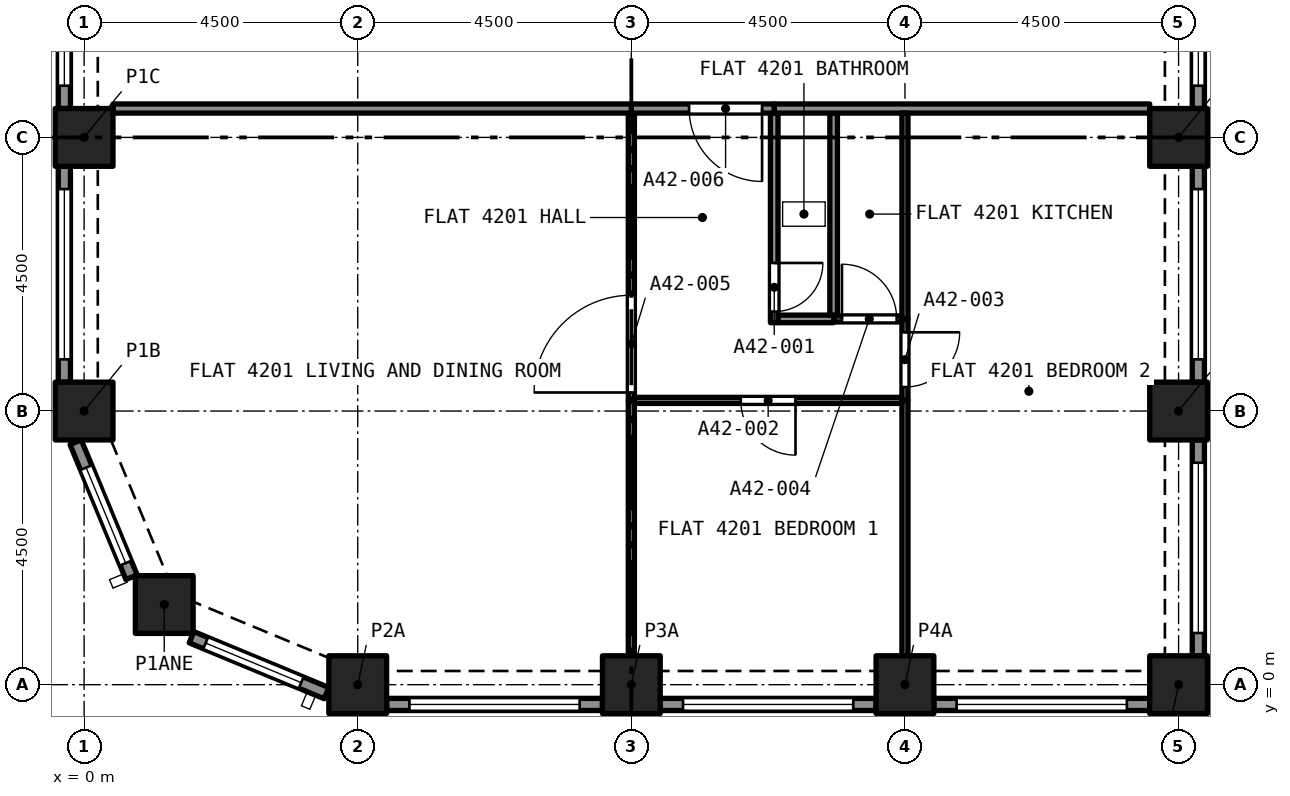
"""IFC4 building model, lengths in metres.
Left out: names, types, materials, properties, quantities, classifications, styles, units other than length and angle.
Written with IfcOpenShell. Run it as: python <this file> out.ifc"""

import sys

from ifc_helpers import new_model, si_unit, direction, frame, frame_2d, origin, origin_2d, place, context, subcontext, project, spatial, rectangle, extrude, element, fill, save


model = new_model("IFC4")
c1 = context("Model", 3, precision=1e-05, world=origin(), true_north=direction((0.0, 1.0)))
c2 = subcontext(c1, "Body", "Model", "MODEL_VIEW")
j1 = project(units=[si_unit("LENGTHUNIT", "METRE"), si_unit("PLANEANGLEUNIT", "RADIAN")], contexts=[c1])
p1 = place(None, origin())
s1 = spatial("IfcSite", under=j1, at=p1, CompositionType="ELEMENT")
p2 = place(p1, origin())
s2 = spatial("IfcBuilding", under=s1, at=p2, CompositionType="ELEMENT")
p3 = place(p2, frame((0.0, 0.0, 150.6)))
s3 = spatial("IfcBuildingStorey", under=s2, at=p3, CompositionType="ELEMENT", Elevation=150.6)
for number, where, z_axis, x_axis in (
    (1, (4.5, 0.0, 0.0), (0.0, 0.0, 1.0), (1.0, 0.0, 0.0)),
    (2, (9.0, 0.0, 0.0), (0.0, 0.0, 1.0), (1.0, 0.0, 0.0)),
    (3, (13.5, 0.0, 0.0), (0.0, 0.0, 1.0), (1.0, 0.0, 0.0)),
    (4, (18.0, 0.0, 0.0), (0.0, 0.0, 1.0), (1.0, 0.0, 0.0)),
    (5, (1.318, 1.318, 0.0), (0.0, 0.0, 1.0), (1.0, 0.0, 0.0)),
    (6, (0.0, 4.5, 0.0), (0.0, 0.0, 1.0), (1.0, 0.0, 0.0)),
    (7, (18.0, 4.5, 0.0), (0.0, 0.0, 1.0), (1.0, 0.0, 0.0)),
    (8, (0.0, 9.0, 0.0), (0.0, 0.0, 1.0), (1.0, 0.0, 0.0)),
    (9, (18.0, 9.0, 0.0), (0.0, 0.0, 1.0), (1.0, 0.0, 0.0)),
):
    element("IfcColumn", number, at=place(p3, frame(where, z_axis=z_axis, x_axis=x_axis)), inside=s3, PredefinedType="COLUMN", context=c2, shape_type="SweptSolid", body=[
        extrude(rectangle(XDim=0.95, YDim=0.95, at=origin_2d()), origin(), (0.0, 0.0, 1.0), 4.4),
    ])
p4 = place(p3, frame((-0.325, 9.475, 0.0), z_axis=(0.0, 0.0, 1.0), x_axis=(0.0, 1.0, 0.0)))
e10 = element("IfcWall", 10, at=p4, inside=s3, PredefinedType="SOLIDWALL", context=c2, shape_type="SweptSolid", body=[
    extrude(rectangle(XDim=3.55, YDim=0.2, at=frame_2d((1.775, 0.0))), origin(), (0.0, 0.0, 1.0), 4.4),
])
p5 = place(p4, frame((0.375, 0.0, 0.45)))
e11 = element("IfcOpeningElement", 11, at=p5, cuts=e10, PredefinedType="OPENING", context=c2, shape_type="SweptSolid", body=[
    extrude(rectangle(XDim=2.8, YDim=2.55, at=frame_2d((1.4, 1.275))), frame((0.0, 0.11, 0.0), z_axis=(0.0, -1.0, 0.0), x_axis=(1.0, 0.0, 0.0)), (0.0, 0.0, 1.0), 0.22),
])
p6 = place(p3, frame((-0.325, 4.975, 0.0), z_axis=(0.0, 0.0, 1.0), x_axis=(0.0, 1.0, 0.0)))
e12 = element("IfcWall", 12, at=p6, inside=s3, PredefinedType="SOLIDWALL", context=c2, shape_type="SweptSolid", body=[
    extrude(rectangle(XDim=3.55, YDim=0.2, at=frame_2d((1.775, 0.0))), origin(), (0.0, 0.0, 1.0), 4.4),
])
p7 = place(p6, frame((0.375, 0.0, 0.45)))
e13 = element("IfcOpeningElement", 13, at=p7, cuts=e12, PredefinedType="OPENING", context=c2, shape_type="SweptSolid", body=[
    extrude(rectangle(XDim=2.8, YDim=2.55, at=frame_2d((1.4, 1.275))), frame((0.0, 0.11, 0.0), z_axis=(0.0, -1.0, 0.0), x_axis=(1.0, 0.0, 0.0)), (0.0, 0.0, 1.0), 0.22),
])
p8 = place(p3, frame((0.78, 1.767, 0.0), z_axis=(0.0, 0.0, 1.0), x_axis=(-0.382680855588, 0.923880599843, 0.0)))
e14 = element("IfcWall", 14, at=p8, inside=s3, PredefinedType="SOLIDWALL", context=c2, shape_type="SweptSolid", body=[
    extrude(rectangle(XDim=2.403, YDim=0.2, at=frame_2d((1.201, 0.0))), origin(), (0.0, 0.0, 1.0), 4.4),
])
p9 = place(p8, frame((0.251, 0.0, 0.45)))
e15 = element("IfcOpeningElement", 15, at=p9, cuts=e14, PredefinedType="OPENING", context=c2, shape_type="SweptSolid", body=[
    extrude(rectangle(XDim=1.7, YDim=2.55, at=frame_2d((0.85, 1.275))), frame((0.0, 0.11, 0.0), z_axis=(0.0, -1.0, 0.0), x_axis=(1.0, 0.0, 0.0)), (0.0, 0.0, 1.0), 0.22),
])
p10 = place(p3, frame((3.987, -0.139, 0.0), z_axis=(0.0, 0.0, 1.0), x_axis=(-0.923880599843, 0.382680855588, 0.0)))
e16 = element("IfcWall", 16, at=p10, inside=s3, PredefinedType="SOLIDWALL", context=c2, shape_type="SweptSolid", body=[
    extrude(rectangle(XDim=2.403, YDim=0.2, at=frame_2d((1.201, 0.0))), origin(), (0.0, 0.0, 1.0), 4.4),
])
p11 = place(p10, frame((0.451, 0.0, 0.45)))
e17 = element("IfcOpeningElement", 17, at=p11, cuts=e16, PredefinedType="OPENING", context=c2, shape_type="SweptSolid", body=[
    extrude(rectangle(XDim=1.7, YDim=2.55, at=frame_2d((0.85, 1.275))), frame((0.0, 0.11, 0.0), z_axis=(0.0, -1.0, 0.0), x_axis=(1.0, 0.0, 0.0)), (0.0, 0.0, 1.0), 0.22),
])
p12 = place(p3, frame((8.525, -0.325, 0.0), z_axis=(0.0, 0.0, 1.0), x_axis=(-1.0, 0.0, 0.0)))
e18 = element("IfcWall", 18, at=p12, inside=s3, PredefinedType="SOLIDWALL", context=c2, shape_type="SweptSolid", body=[
    extrude(rectangle(XDim=3.55, YDim=0.2, at=frame_2d((1.775, 0.0))), origin(), (0.0, 0.0, 1.0), 4.4),
])
p13 = place(p12, frame((0.375, 0.0, 0.45)))
e19 = element("IfcOpeningElement", 19, at=p13, cuts=e18, PredefinedType="OPENING", context=c2, shape_type="SweptSolid", body=[
    extrude(rectangle(XDim=2.8, YDim=2.55, at=frame_2d((1.4, 1.275))), frame((0.0, 0.11, 0.0), z_axis=(0.0, -1.0, 0.0), x_axis=(1.0, 0.0, 0.0)), (0.0, 0.0, 1.0), 0.22),
])
p14 = place(p3, frame((13.025, -0.325, 0.0), z_axis=(0.0, 0.0, 1.0), x_axis=(-1.0, 0.0, 0.0)))
e20 = element("IfcWall", 20, at=p14, inside=s3, PredefinedType="SOLIDWALL", context=c2, shape_type="SweptSolid", body=[
    extrude(rectangle(XDim=3.55, YDim=0.2, at=frame_2d((1.775, 0.0))), origin(), (0.0, 0.0, 1.0), 4.4),
])
p15 = place(p14, frame((0.375, 0.0, 0.45)))
e21 = element("IfcOpeningElement", 21, at=p15, cuts=e20, PredefinedType="OPENING", context=c2, shape_type="SweptSolid", body=[
    extrude(rectangle(XDim=2.8, YDim=2.55, at=frame_2d((1.4, 1.275))), frame((0.0, 0.11, 0.0), z_axis=(0.0, -1.0, 0.0), x_axis=(1.0, 0.0, 0.0)), (0.0, 0.0, 1.0), 0.22),
])
p16 = place(p3, frame((17.525, -0.325, 0.0), z_axis=(0.0, 0.0, 1.0), x_axis=(-1.0, 0.0, 0.0)))
e22 = element("IfcWall", 22, at=p16, inside=s3, PredefinedType="SOLIDWALL", context=c2, shape_type="SweptSolid", body=[
    extrude(rectangle(XDim=3.55, YDim=0.2, at=frame_2d((1.775, 0.0))), origin(), (0.0, 0.0, 1.0), 4.4),
])
p17 = place(p16, frame((0.375, 0.0, 0.45)))
e23 = element("IfcOpeningElement", 23, at=p17, cuts=e22, PredefinedType="OPENING", context=c2, shape_type="SweptSolid", body=[
    extrude(rectangle(XDim=2.8, YDim=2.55, at=frame_2d((1.4, 1.275))), frame((0.0, 0.11, 0.0), z_axis=(0.0, -1.0, 0.0), x_axis=(1.0, 0.0, 0.0)), (0.0, 0.0, 1.0), 0.22),
])
p18 = place(p3, frame((18.325, 4.025, 0.0), z_axis=(0.0, 0.0, 1.0), x_axis=(0.0, -1.0, 0.0)))
e24 = element("IfcWall", 24, at=p18, inside=s3, PredefinedType="SOLIDWALL", context=c2, shape_type="SweptSolid", body=[
    extrude(rectangle(XDim=3.55, YDim=0.2, at=frame_2d((1.775, 0.0))), origin(), (0.0, 0.0, 1.0), 4.4),
])
p19 = place(p18, frame((0.375, 0.0, 0.45)))
e25 = element("IfcOpeningElement", 25, at=p19, cuts=e24, PredefinedType="OPENING", context=c2, shape_type="SweptSolid", body=[
    extrude(rectangle(XDim=2.8, YDim=2.55, at=frame_2d((1.4, 1.275))), frame((0.0, 0.11, 0.0), z_axis=(0.0, -1.0, 0.0), x_axis=(1.0, 0.0, 0.0)), (0.0, 0.0, 1.0), 0.22),
])
p20 = place(p3, frame((18.325, 8.525, 0.0), z_axis=(0.0, 0.0, 1.0), x_axis=(0.0, -1.0, 0.0)))
e26 = element("IfcWall", 26, at=p20, inside=s3, PredefinedType="SOLIDWALL", context=c2, shape_type="SweptSolid", body=[
    extrude(rectangle(XDim=3.55, YDim=0.2, at=frame_2d((1.775, 0.0))), origin(), (0.0, 0.0, 1.0), 4.4),
])
p21 = place(p20, frame((0.375, 0.0, 0.45)))
e27 = element("IfcOpeningElement", 27, at=p21, cuts=e26, PredefinedType="OPENING", context=c2, shape_type="SweptSolid", body=[
    extrude(rectangle(XDim=2.8, YDim=2.55, at=frame_2d((1.4, 1.275))), frame((0.0, 0.11, 0.0), z_axis=(0.0, -1.0, 0.0), x_axis=(1.0, 0.0, 0.0)), (0.0, 0.0, 1.0), 0.22),
])
p22 = place(p3, frame((18.325, 13.025, 0.0), z_axis=(0.0, 0.0, 1.0), x_axis=(0.0, -1.0, 0.0)))
e28 = element("IfcWall", 28, at=p22, inside=s3, PredefinedType="SOLIDWALL", context=c2, shape_type="SweptSolid", body=[
    extrude(rectangle(XDim=3.55, YDim=0.2, at=frame_2d((1.775, 0.0))), origin(), (0.0, 0.0, 1.0), 4.4),
])
p23 = place(p22, frame((0.375, 0.0, 0.45)))
e29 = element("IfcOpeningElement", 29, at=p23, cuts=e28, PredefinedType="OPENING", context=c2, shape_type="SweptSolid", body=[
    extrude(rectangle(XDim=2.8, YDim=2.55, at=frame_2d((1.4, 1.275))), frame((0.0, 0.11, 0.0), z_axis=(0.0, -1.0, 0.0), x_axis=(1.0, 0.0, 0.0)), (0.0, 0.0, 1.0), 0.22),
])
p24 = place(p3, frame((11.413, 6.015, 0.0), z_axis=(0.0, 0.0, 1.0), x_axis=(1.0, 0.0, 0.0)))
e30 = element("IfcWall", 30, at=p24, inside=s3, PredefinedType="PARTITIONING", context=c2, shape_type="SweptSolid", body=[
    extrude(rectangle(XDim=0.915, YDim=0.125, at=frame_2d((0.458, 0.0))), origin(), (0.0, 0.0, 1.0), 4.1),
])
p25 = place(p3, frame((11.35, 9.4, 0.0), z_axis=(0.0, 0.0, 1.0), x_axis=(0.0, -1.0, 0.0)))
e31 = element("IfcWall", 31, at=p25, inside=s3, PredefinedType="PARTITIONING", context=c2, shape_type="SweptSolid", body=[
    extrude(rectangle(XDim=3.448, YDim=0.125, at=frame_2d((1.724, 0.0))), origin(), (0.0, 0.0, 1.0), 4.1),
])
p26 = place(p25, frame((2.465, 0.0, 0.0)))
e32 = element("IfcOpeningElement", 32, at=p26, cuts=e31, PredefinedType="OPENING", context=c2, shape_type="SweptSolid", body=[
    extrude(rectangle(XDim=0.8, YDim=2.1, at=frame_2d((0.4, 1.05))), frame((0.0, 0.073, 0.0), z_axis=(0.0, -1.0, 0.0), x_axis=(1.0, 0.0, 0.0)), (0.0, 0.0, 1.0), 0.145),
])
p27 = place(p3, frame((12.327, 6.077, 0.0), z_axis=(0.0, 0.0, 1.0), x_axis=(0.0, 1.0, 0.0)))
e33 = element("IfcWall", 33, at=p27, inside=s3, PredefinedType="PARTITIONING", context=c2, shape_type="SweptSolid", body=[
    extrude(rectangle(XDim=3.323, YDim=0.125, at=frame_2d((1.661, 0.0))), origin(), (0.0, 0.0, 1.0), 4.1),
])
p28 = place(p3, frame((11.35, 9.475, 0.0), z_axis=(0.0, 0.0, 1.0), x_axis=(1.0, 0.0, 0.0)))
e34 = element("IfcWall", 34, at=p28, inside=s3, PredefinedType="PARTITIONING", context=c2, shape_type="SweptSolid", body=[
    extrude(rectangle(XDim=6.175, YDim=0.15, at=frame_2d((3.087, 0.0))), origin(), (0.0, 0.0, 1.0), 4.1),
])
p29 = place(p3, frame((13.5, 0.475, 0.0), z_axis=(0.0, 0.0, 1.0), x_axis=(0.0, 1.0, 0.0)))
e35 = element("IfcWall", 35, at=p29, inside=s3, PredefinedType="PARTITIONING", context=c2, shape_type="SweptSolid", body=[
    extrude(rectangle(XDim=4.2, YDim=0.1, at=frame_2d((2.1, 0.0))), origin(), (0.0, 0.0, 1.0), 4.1),
])
p30 = place(p3, frame((13.45, 4.675, 0.0), z_axis=(0.0, 0.0, 1.0), x_axis=(-1.0, 0.0, 0.0)))
e36 = element("IfcWall", 36, at=p30, inside=s3, PredefinedType="PARTITIONING", context=c2, shape_type="SweptSolid", body=[
    extrude(rectangle(XDim=4.4, YDim=0.1, at=frame_2d((2.2, 0.0))), origin(), (0.0, 0.0, 1.0), 4.1),
])
p31 = place(p30, frame((1.75, 0.0, 0.0)))
e37 = element("IfcOpeningElement", 37, at=p31, cuts=e36, PredefinedType="OPENING", context=c2, shape_type="SweptSolid", body=[
    extrude(rectangle(XDim=0.9, YDim=2.1, at=frame_2d((0.45, 1.05))), frame((0.0, 0.06, 0.0), z_axis=(0.0, -1.0, 0.0), x_axis=(1.0, 0.0, 0.0)), (0.0, 0.0, 1.0), 0.12),
])
p32 = place(p3, frame((9.0, 0.475, 0.0), z_axis=(0.0, 0.0, 1.0), x_axis=(0.0, 1.0, 0.0)))
e38 = element("IfcWall", 38, at=p32, inside=s3, PredefinedType="PARTITIONING", context=c2, shape_type="SweptSolid", body=[
    extrude(rectangle(XDim=4.2, YDim=0.1, at=frame_2d((2.1, 0.0))), origin(), (0.0, 0.0, 1.0), 4.1),
])
p33 = place(p3, frame((13.5, 6.015, 0.0), z_axis=(0.0, 0.0, 1.0), x_axis=(0.0, -1.0, 0.0)))
e39 = element("IfcWall", 39, at=p33, inside=s3, PredefinedType="PARTITIONING", context=c2, shape_type="SweptSolid", body=[
    extrude(rectangle(XDim=1.34, YDim=0.1, at=frame_2d((0.67, 0.0))), origin(), (0.0, 0.0, 1.0), 4.1),
])
p34 = place(p33, frame((0.22, 0.0, 0.0)))
e40 = element("IfcOpeningElement", 40, at=p34, cuts=e39, PredefinedType="OPENING", context=c2, shape_type="SweptSolid", body=[
    extrude(rectangle(XDim=0.9, YDim=2.1, at=frame_2d((0.45, 1.05))), frame((0.0, 0.06, 0.0), z_axis=(0.0, -1.0, 0.0), x_axis=(1.0, 0.0, 0.0)), (0.0, 0.0, 1.0), 0.12),
])
p35 = place(p3, frame((13.5, 6.015, 0.0), z_axis=(0.0, 0.0, 1.0), x_axis=(0.0, 1.0, 0.0)))
e41 = element("IfcWall", 41, at=p35, inside=s3, PredefinedType="PARTITIONING", context=c2, shape_type="SweptSolid", body=[
    extrude(rectangle(XDim=3.385, YDim=0.1, at=frame_2d((1.692, 0.0))), origin(), (0.0, 0.0, 1.0), 4.1),
])
p36 = place(p3, frame((12.327, 6.015, 0.0), z_axis=(0.0, 0.0, 1.0), x_axis=(1.0, 0.0, 0.0)))
e42 = element("IfcWall", 42, at=p36, inside=s3, PredefinedType="PARTITIONING", context=c2, shape_type="SweptSolid", body=[
    extrude(rectangle(XDim=1.123, YDim=0.1, at=frame_2d((0.561, 0.0))), origin(), (0.0, 0.0, 1.0), 4.1),
])
p37 = place(p36, frame((0.136, 0.0, 0.0)))
e43 = element("IfcOpeningElement", 43, at=p37, cuts=e42, PredefinedType="OPENING", context=c2, shape_type="SweptSolid", body=[
    extrude(rectangle(XDim=0.9, YDim=2.1, at=frame_2d((0.45, 1.05))), frame((0.0, 0.06, 0.0), z_axis=(0.0, -1.0, 0.0), x_axis=(1.0, 0.0, 0.0)), (0.0, 0.0, 1.0), 0.12),
])
p38 = place(p3, frame((9.0, 4.675, 0.0), z_axis=(0.0, 0.0, 1.0), x_axis=(0.0, 1.0, 0.0)))
e44 = element("IfcWall", 44, at=p38, inside=s3, PredefinedType="PARTITIONING", context=c2, shape_type="SweptSolid", body=[
    extrude(rectangle(XDim=4.725, YDim=0.1, at=frame_2d((2.362, 0.0))), origin(), (0.0, 0.0, 1.0), 4.1),
])
p39 = place(p38, frame((0.13, 0.0, 0.0)))
e45 = element("IfcOpeningElement", 45, at=p39, cuts=e44, PredefinedType="OPENING", context=c2, shape_type="SweptSolid", body=[
    extrude(rectangle(XDim=1.6, YDim=2.1, at=frame_2d((0.8, 1.05))), frame((0.0, 0.06, 0.0), z_axis=(0.0, -1.0, 0.0), x_axis=(1.0, 0.0, 0.0)), (0.0, 0.0, 1.0), 0.12),
])
p40 = place(p3, frame((11.35, 9.475, 0.0), z_axis=(0.0, 0.0, 1.0), x_axis=(-1.0, 0.0, 0.0)))
e46 = element("IfcWall", 46, at=p40, inside=s3, PredefinedType="PARTITIONING", context=c2, shape_type="SweptSolid", body=[
    extrude(rectangle(XDim=2.35, YDim=0.15, at=frame_2d((1.175, 0.0))), origin(), (0.0, 0.0, 1.0), 4.1),
])
p41 = place(p40, frame((0.2, 0.0, 0.0)))
e47 = element("IfcOpeningElement", 47, at=p41, cuts=e46, PredefinedType="OPENING", context=c2, shape_type="SweptSolid", body=[
    extrude(rectangle(XDim=1.2, YDim=2.4, at=frame_2d((0.6, 1.2))), frame((0.0, 0.085, 0.0), z_axis=(0.0, -1.0, 0.0), x_axis=(1.0, 0.0, 0.0)), (0.0, 0.0, 1.0), 0.17),
])
p42 = place(p3, frame((0.475, 9.475, 0.0), z_axis=(0.0, 0.0, 1.0), x_axis=(1.0, 0.0, 0.0)))
e48 = element("IfcWall", 48, at=p42, inside=s3, PredefinedType="PARTITIONING", context=c2, shape_type="SweptSolid", body=[
    extrude(rectangle(XDim=8.525, YDim=0.15, at=frame_2d((4.262, 0.0))), origin(), (0.0, 0.0, 1.0), 4.1),
])
p43 = place(p5, origin())
e49 = element("IfcWindow", 49, at=p43, inside=s3, PartitioningType="SINGLE_PANEL", PredefinedType="WINDOW", context=c2, shape_type="SweptSolid", body=[
    extrude(rectangle(XDim=2.8, YDim=2.55, at=frame_2d((1.4, 1.275))), frame((0.0, 0.03, 0.0), z_axis=(0.0, -1.0, 0.0), x_axis=(1.0, 0.0, 0.0)), (0.0, 0.0, 1.0), 0.06),
])
fill(e11, e49)
p44 = place(p7, origin())
e50 = element("IfcWindow", 50, at=p44, inside=s3, PartitioningType="SINGLE_PANEL", PredefinedType="WINDOW", context=c2, shape_type="SweptSolid", body=[
    extrude(rectangle(XDim=2.8, YDim=2.55, at=frame_2d((1.4, 1.275))), frame((0.0, 0.03, 0.0), z_axis=(0.0, -1.0, 0.0), x_axis=(1.0, 0.0, 0.0)), (0.0, 0.0, 1.0), 0.06),
])
fill(e13, e50)
p45 = place(p9, origin())
e51 = element("IfcWindow", 51, at=p45, inside=s3, PartitioningType="SINGLE_PANEL", PredefinedType="WINDOW", context=c2, shape_type="SweptSolid", body=[
    extrude(rectangle(XDim=1.7, YDim=2.55, at=frame_2d((0.85, 1.275))), frame((0.0, 0.03, 0.0), z_axis=(0.0, -1.0, 0.0), x_axis=(1.0, 0.0, 0.0)), (0.0, 0.0, 1.0), 0.06),
])
fill(e15, e51)
p46 = place(p11, origin())
e52 = element("IfcWindow", 52, at=p46, inside=s3, PartitioningType="SINGLE_PANEL", PredefinedType="WINDOW", context=c2, shape_type="SweptSolid", body=[
    extrude(rectangle(XDim=1.7, YDim=2.55, at=frame_2d((0.85, 1.275))), frame((0.0, 0.03, 0.0), z_axis=(0.0, -1.0, 0.0), x_axis=(1.0, 0.0, 0.0)), (0.0, 0.0, 1.0), 0.06),
])
fill(e17, e52)
p47 = place(p13, origin())
e53 = element("IfcWindow", 53, at=p47, inside=s3, PartitioningType="SINGLE_PANEL", PredefinedType="WINDOW", context=c2, shape_type="SweptSolid", body=[
    extrude(rectangle(XDim=2.8, YDim=2.55, at=frame_2d((1.4, 1.275))), frame((0.0, 0.03, 0.0), z_axis=(0.0, -1.0, 0.0), x_axis=(1.0, 0.0, 0.0)), (0.0, 0.0, 1.0), 0.06),
])
fill(e19, e53)
p48 = place(p15, origin())
e54 = element("IfcWindow", 54, at=p48, inside=s3, PartitioningType="SINGLE_PANEL", PredefinedType="WINDOW", context=c2, shape_type="SweptSolid", body=[
    extrude(rectangle(XDim=2.8, YDim=2.55, at=frame_2d((1.4, 1.275))), frame((0.0, 0.03, 0.0), z_axis=(0.0, -1.0, 0.0), x_axis=(1.0, 0.0, 0.0)), (0.0, 0.0, 1.0), 0.06),
])
fill(e21, e54)
p49 = place(p17, origin())
e55 = element("IfcWindow", 55, at=p49, inside=s3, PartitioningType="SINGLE_PANEL", PredefinedType="WINDOW", context=c2, shape_type="SweptSolid", body=[
    extrude(rectangle(XDim=2.8, YDim=2.55, at=frame_2d((1.4, 1.275))), frame((0.0, 0.03, 0.0), z_axis=(0.0, -1.0, 0.0), x_axis=(1.0, 0.0, 0.0)), (0.0, 0.0, 1.0), 0.06),
])
fill(e23, e55)
p50 = place(p19, origin())
e56 = element("IfcWindow", 56, at=p50, inside=s3, PartitioningType="SINGLE_PANEL", PredefinedType="WINDOW", context=c2, shape_type="SweptSolid", body=[
    extrude(rectangle(XDim=2.8, YDim=2.55, at=frame_2d((1.4, 1.275))), frame((0.0, 0.03, 0.0), z_axis=(0.0, -1.0, 0.0), x_axis=(1.0, 0.0, 0.0)), (0.0, 0.0, 1.0), 0.06),
])
fill(e25, e56)
p51 = place(p21, origin())
e57 = element("IfcWindow", 57, at=p51, inside=s3, PartitioningType="SINGLE_PANEL", PredefinedType="WINDOW", context=c2, shape_type="SweptSolid", body=[
    extrude(rectangle(XDim=2.8, YDim=2.55, at=frame_2d((1.4, 1.275))), frame((0.0, 0.03, 0.0), z_axis=(0.0, -1.0, 0.0), x_axis=(1.0, 0.0, 0.0)), (0.0, 0.0, 1.0), 0.06),
])
fill(e27, e57)
p52 = place(p23, origin())
e58 = element("IfcWindow", 58, at=p52, inside=s3, PartitioningType="SINGLE_PANEL", PredefinedType="WINDOW", context=c2, shape_type="SweptSolid", body=[
    extrude(rectangle(XDim=2.8, YDim=2.55, at=frame_2d((1.4, 1.275))), frame((0.0, 0.03, 0.0), z_axis=(0.0, -1.0, 0.0), x_axis=(1.0, 0.0, 0.0)), (0.0, 0.0, 1.0), 0.06),
])
fill(e29, e58)
p53 = place(p26, origin())
e59 = element("IfcDoor", 59, at=p53, inside=s3, OperationType="SINGLE_SWING_RIGHT", PredefinedType="DOOR", context=c2, shape_type="SweptSolid", body=[
    extrude(rectangle(XDim=0.8, YDim=2.1, at=frame_2d((0.4, 1.05))), frame((0.0, 0.025, 0.0), z_axis=(0.0, -1.0, 0.0), x_axis=(1.0, 0.0, 0.0)), (0.0, 0.0, 1.0), 0.05),
])
fill(e32, e59)
p54 = place(p31, origin())
e60 = element("IfcDoor", 60, at=p54, inside=s3, OperationType="SINGLE_SWING_RIGHT", PredefinedType="DOOR", context=c2, shape_type="SweptSolid", body=[
    extrude(rectangle(XDim=0.9, YDim=2.1, at=frame_2d((0.45, 1.05))), frame((0.0, 0.025, 0.0), z_axis=(0.0, -1.0, 0.0), x_axis=(1.0, 0.0, 0.0)), (0.0, 0.0, 1.0), 0.05),
])
fill(e37, e60)
p55 = place(p34, origin())
e61 = element("IfcDoor", 61, at=p55, inside=s3, OperationType="SINGLE_SWING_RIGHT", PredefinedType="DOOR", context=c2, shape_type="SweptSolid", body=[
    extrude(rectangle(XDim=0.9, YDim=2.1, at=frame_2d((0.45, 1.05))), frame((0.0, 0.025, 0.0), z_axis=(0.0, -1.0, 0.0), x_axis=(1.0, 0.0, 0.0)), (0.0, 0.0, 1.0), 0.05),
])
fill(e40, e61)
p56 = place(p37, origin())
e62 = element("IfcDoor", 62, at=p56, inside=s3, OperationType="SINGLE_SWING_RIGHT", PredefinedType="DOOR", context=c2, shape_type="SweptSolid", body=[
    extrude(rectangle(XDim=0.9, YDim=2.1, at=frame_2d((0.45, 1.05))), frame((0.0, 0.025, 0.0), z_axis=(0.0, -1.0, 0.0), x_axis=(1.0, 0.0, 0.0)), (0.0, 0.0, 1.0), 0.05),
])
fill(e43, e62)
p57 = place(p39, origin())
e63 = element("IfcDoor", 63, at=p57, inside=s3, OperationType="SINGLE_SWING_LEFT", PredefinedType="DOOR", context=c2, shape_type="SweptSolid", body=[
    extrude(rectangle(XDim=1.6, YDim=2.1, at=frame_2d((0.8, 1.05))), frame((0.0, 0.025, 0.0), z_axis=(0.0, -1.0, 0.0), x_axis=(1.0, 0.0, 0.0)), (0.0, 0.0, 1.0), 0.05),
])
fill(e45, e63)
p58 = place(p41, origin())
e64 = element("IfcDoor", 64, at=p58, inside=s3, OperationType="SINGLE_SWING_LEFT", PredefinedType="DOOR", context=c2, shape_type="SweptSolid", body=[
    extrude(rectangle(XDim=1.2, YDim=2.4, at=frame_2d((0.6, 1.2))), frame((0.0, 0.025, 0.0), z_axis=(0.0, -1.0, 0.0), x_axis=(1.0, 0.0, 0.0)), (0.0, 0.0, 1.0), 0.05),
])
fill(e47, e64)
save(model, sys.argv[1])
